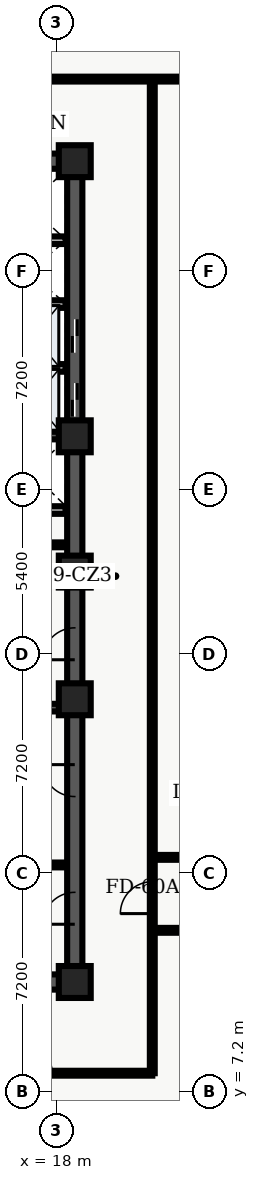
"""IFC4 building model, lengths in metres.
Left out: names, types, materials, properties, quantities, classifications, styles, units other than length and angle.
Written with IfcOpenShell. Run it as: python <this file> out.ifc"""

import sys

from ifc_helpers import new_model, entity, si_unit, converted_unit, direction, frame, origin_with_axes, origin_2d_with_axis, place, context, subcontext, project, spatial, polyline, rectangle, outline, extrude, element, fill, save


model = new_model("IFC4")
c1 = context("Model", 3, precision=1e-05, world=origin_with_axes(), true_north=direction((0.0, 1.0)))
c2 = subcontext(c1, "Body", "Model", "MODEL_VIEW")
j1 = project(units=[si_unit("LENGTHUNIT", "METRE"), converted_unit("PLANEANGLEUNIT", "DEGREE", entity("IfcPlaneAngleMeasure", 0.017), si_unit("PLANEANGLEUNIT", "RADIAN"), dimensions=[0, 0, 0, 0, 0, 0, 0])], contexts=[c1])
p1 = place(None, origin_with_axes())
s1 = spatial("IfcSite", under=j1, at=p1, CompositionType="ELEMENT")
p2 = place(p1, origin_with_axes())
s2 = spatial("IfcBuilding", under=s1, at=p2, CompositionType="ELEMENT")
p3 = place(p2, frame((0.0, 0.0, 160.2), z_axis=(0.0, 0.0, 1.0), x_axis=(1.0, 0.0, 0.0)))
s3 = spatial("IfcBuildingStorey", under=s2, at=p3, CompositionType="ELEMENT", Elevation=160.2)
p4 = place(p3, frame((11.4, 10.8, 0.0), z_axis=(0.0, 0.0, 1.0), x_axis=(1.0, 0.0, 0.0)))
e1 = element("IfcWall", 1, at=p4, inside=s3, PredefinedType="SHEAR", context=c2, shape_type="SweptSolid", body=[
    extrude(outline(polyline([(0.0, -0.25), (7.2, -0.25), (7.2, 0.25), (0.0, 0.25), (0.0, -0.25)])), origin_with_axes(), (0.0, 0.0, 1.0), 3.66),
])
p5 = place(p4, frame((2.625, 0.0, 0.0), z_axis=(0.0, 0.0, 1.0), x_axis=(1.0, 0.0, 0.0)))
e2 = element("IfcOpeningElement", 2, at=p5, cuts=e1, PredefinedType="OPENING", context=c2, shape_type="SweptSolid", body=[
    extrude(rectangle(XDim=1.05, YDim=0.52, at=origin_2d_with_axis()), origin_with_axes(), (0.0, 0.0, 1.0), 2.15),
])
p6 = place(p3, frame((11.4, 37.8, 0.0), z_axis=(0.0, 0.0, 1.0), x_axis=(1.0, 0.0, 0.0)))
e3 = element("IfcWall", 3, at=p6, inside=s3, PredefinedType="SHEAR", context=c2, shape_type="SweptSolid", body=[
    extrude(outline(polyline([(0.0, -0.25), (7.2, -0.25), (7.2, 0.25), (0.0, 0.25), (0.0, -0.25)])), origin_with_axes(), (0.0, 0.0, 1.0), 3.66),
])
p7 = place(p6, frame((2.625, 0.0, 0.0), z_axis=(0.0, 0.0, 1.0), x_axis=(1.0, 0.0, 0.0)))
e4 = element("IfcOpeningElement", 4, at=p7, cuts=e3, PredefinedType="OPENING", context=c2, shape_type="SweptSolid", body=[
    extrude(rectangle(XDim=1.05, YDim=0.52, at=origin_2d_with_axis()), origin_with_axes(), (0.0, 0.0, 1.0), 2.15),
])
p8 = place(p3, frame((18.6, 10.8, 0.0), z_axis=(0.0, 0.0, 1.0), x_axis=(0.0, 1.0, 0.0)))
e5 = element("IfcWall", 5, at=p8, inside=s3, PredefinedType="SHEAR", context=c2, shape_type="SweptSolid", body=[
    extrude(outline(polyline([(0.0, -0.25), (13.5, -0.25), (13.5, 0.25), (0.0, 0.25), (0.0, -0.25)])), origin_with_axes(), (0.0, 0.0, 1.0), 3.66),
])
p9 = place(p8, frame((11.125, 0.0, 0.0), z_axis=(0.0, 0.0, 1.0), x_axis=(1.0, 0.0, 0.0)))
e6 = element("IfcOpeningElement", 6, at=p9, cuts=e5, PredefinedType="OPENING", context=c2, shape_type="SweptSolid", body=[
    extrude(rectangle(XDim=1.05, YDim=0.52, at=origin_2d_with_axis()), origin_with_axes(), (0.0, 0.0, 1.0), 2.15),
])
p10 = place(p8, frame((2.425, 0.0, 0.0), z_axis=(0.0, 0.0, 1.0), x_axis=(1.0, 0.0, 0.0)))
e7 = element("IfcOpeningElement", 7, at=p10, cuts=e5, PredefinedType="OPENING", context=c2, shape_type="SweptSolid", body=[
    extrude(rectangle(XDim=1.05, YDim=0.52, at=origin_2d_with_axis()), origin_with_axes(), (0.0, 0.0, 1.0), 2.15),
])
p11 = place(p8, frame((6.625, 0.0, 0.0), z_axis=(0.0, 0.0, 1.0), x_axis=(1.0, 0.0, 0.0)))
e8 = element("IfcOpeningElement", 8, at=p11, cuts=e5, PredefinedType="OPENING", context=c2, shape_type="SweptSolid", body=[
    extrude(rectangle(XDim=1.05, YDim=0.52, at=origin_2d_with_axis()), origin_with_axes(), (0.0, 0.0, 1.0), 2.15),
])
p12 = place(p3, frame((18.6, 24.3, 0.0), z_axis=(0.0, 0.0, 1.0), x_axis=(0.0, 1.0, 0.0)))
e9 = element("IfcWall", 9, at=p12, inside=s3, PredefinedType="SHEAR", context=c2, shape_type="SweptSolid", body=[
    extrude(outline(polyline([(0.0, -0.25), (13.5, -0.25), (13.5, 0.25), (0.0, 0.25), (0.0, -0.25)])), origin_with_axes(), (0.0, 0.0, 1.0), 3.66),
])
p13 = place(p12, frame((5.65, 0.0, 0.0), z_axis=(0.0, 0.0, 1.0), x_axis=(1.0, 0.0, 0.0)))
e10 = element("IfcOpeningElement", 10, at=p13, cuts=e9, PredefinedType="OPENING", context=c2, shape_type="SweptSolid", body=[
    extrude(rectangle(XDim=1.1, YDim=0.52, at=origin_2d_with_axis()), origin_with_axes(), (0.0, 0.0, 1.0), 2.15),
])
p14 = place(p12, frame((7.75, 0.0, 0.0), z_axis=(0.0, 0.0, 1.0), x_axis=(1.0, 0.0, 0.0)))
e11 = element("IfcOpeningElement", 11, at=p14, cuts=e9, PredefinedType="OPENING", context=c2, shape_type="SweptSolid", body=[
    extrude(rectangle(XDim=1.1, YDim=0.52, at=origin_2d_with_axis()), origin_with_axes(), (0.0, 0.0, 1.0), 2.15),
])
for number, where, z_axis, x_axis in (
    (12, (11.65, 19.825, 0.0), (0.0, 0.0, 1.0), (1.0, 0.0, 0.0)),
    (13, (11.65, 28.775, 0.0), (0.0, 0.0, 1.0), (1.0, 0.0, 0.0)),
):
    element("IfcWall", number, at=place(p3, frame(where, z_axis=z_axis, x_axis=x_axis)), inside=s3, PredefinedType="SHEAR", context=c2, shape_type="SweptSolid", body=[
        extrude(outline(polyline([(0.0, -0.125), (6.7, -0.125), (6.7, 0.125), (0.0, 0.125), (0.0, -0.125)])), origin_with_axes(), (0.0, 0.0, 1.0), 3.66),
    ])
p15 = place(p3, frame((11.7, 24.1, 0.0), z_axis=(0.0, 0.0, 1.0), x_axis=(1.0, 0.0, 0.0)))
e14 = element("IfcWall", 14, at=p15, inside=s3, PredefinedType="SOLIDWALL", context=c2, shape_type="SweptSolid", body=[
    extrude(outline(polyline([(0.0, -0.125), (6.6, -0.125), (6.6, 0.125), (0.0, 0.125), (0.0, -0.125)])), origin_with_axes(), (0.0, 0.0, 1.0), 2.7),
])
p16 = place(p15, frame((3.75, 0.0, 0.0), z_axis=(0.0, 0.0, 1.0), x_axis=(1.0, 0.0, 0.0)))
e15 = element("IfcOpeningElement", 15, at=p16, cuts=e14, PredefinedType="OPENING", context=c2, shape_type="SweptSolid", body=[
    extrude(rectangle(XDim=0.9, YDim=0.27, at=origin_2d_with_axis()), origin_with_axes(), (0.0, 0.0, 1.0), 2.15),
])
p17 = place(p3, frame((11.7, 26.325, 0.0), z_axis=(0.0, 0.0, 1.0), x_axis=(1.0, 0.0, 0.0)))
e16 = element("IfcWall", 16, at=p17, inside=s3, PredefinedType="SOLIDWALL", context=c2, shape_type="SweptSolid", body=[
    extrude(outline(polyline([(0.0, -0.125), (6.6, -0.125), (6.6, 0.125), (0.0, 0.125), (0.0, -0.125)])), origin_with_axes(), (0.0, 0.0, 1.0), 2.7),
])
p18 = place(p17, frame((3.5, 0.0, 0.0), z_axis=(0.0, 0.0, 1.0), x_axis=(1.0, 0.0, 0.0)))
e17 = element("IfcOpeningElement", 17, at=p18, cuts=e16, PredefinedType="OPENING", context=c2, shape_type="SweptSolid", body=[
    extrude(rectangle(XDim=0.9, YDim=0.27, at=origin_2d_with_axis()), origin_with_axes(), (0.0, 0.0, 1.0), 2.15),
])
for number, where, z_axis, x_axis in (
    (18, (18.6, 10.8, 0.0), (0.0, 0.0, 1.0), (1.0, 0.0, 0.0)),
    (19, (18.6, 20.1, 0.0), (0.0, 0.0, 1.0), (1.0, 0.0, 0.0)),
    (20, (18.6, 24.3, 0.0), (0.0, 0.0, 1.0), (1.0, 0.0, 0.0)),
    (21, (18.6, 28.75, 0.0), (0.0, 0.0, 1.0), (1.0, 0.0, 0.0)),
    (22, (18.6, 37.8, 0.0), (0.0, 0.0, 1.0), (1.0, 0.0, 0.0)),
):
    element("IfcColumn", number, at=place(p3, frame(where, z_axis=z_axis, x_axis=x_axis)), inside=s3, PredefinedType="COLUMN", context=c2, shape_type="SweptSolid", body=[
        extrude(rectangle(XDim=1.05, YDim=1.05, at=origin_2d_with_axis()), origin_with_axes(), (0.0, 0.0, 1.0), 3.9),
    ])
p19 = place(p3, frame((14.62, 25.18, 0.0), z_axis=(0.0, 0.0, 1.0), x_axis=(1.0, 0.0, 0.0)))
e23 = element("IfcWall", 23, at=p19, inside=s3, PredefinedType="PARTITIONING", context=c2, shape_type="SweptSolid", body=[
    extrude(outline(polyline([(0.0, -0.08), (3.68, -0.08), (3.68, 0.08), (0.0, 0.08), (0.0, -0.08)])), origin_with_axes(), (0.0, 0.0, 1.0), 2.7),
])
p20 = place(p19, frame((1.95, 0.0, 0.0), z_axis=(0.0, 0.0, 1.0), x_axis=(1.0, 0.0, 0.0)))
e24 = element("IfcOpeningElement", 24, at=p20, cuts=e23, PredefinedType="OPENING", context=c2, shape_type="SweptSolid", body=[
    extrude(rectangle(XDim=0.9, YDim=0.18, at=origin_2d_with_axis()), origin_with_axes(), (0.0, 0.0, 1.0), 2.15),
])
p21 = place(p3, frame((15.84, 14.65, 0.0), z_axis=(0.0, 0.0, 1.0), x_axis=(1.0, 0.0, 0.0)))
e25 = element("IfcWall", 25, at=p21, inside=s3, PredefinedType="PARTITIONING", context=c2, shape_type="SweptSolid", body=[
    extrude(outline(polyline([(0.0, -0.08), (2.46, -0.08), (2.46, 0.08), (0.0, 0.08), (0.0, -0.08)])), origin_with_axes(), (0.0, 0.0, 1.0), 2.7),
])
for number, where, z_axis, x_axis in (
    (26, (15.84, 31.0, 0.0), (0.0, 0.0, 1.0), (1.0, 0.0, 0.0)),
    (27, (15.84, 33.1, 0.0), (0.0, 0.0, 1.0), (1.0, 0.0, 0.0)),
    (28, (15.84, 35.2, 0.0), (0.0, 0.0, 1.0), (1.0, 0.0, 0.0)),
):
    element("IfcWall", number, at=place(p3, frame(where, z_axis=z_axis, x_axis=x_axis)), inside=s3, PredefinedType="SOLIDWALL", context=c2, shape_type="SweptSolid", body=[
        extrude(outline(polyline([(0.0, -0.125), (2.46, -0.125), (2.46, 0.125), (0.0, 0.125), (0.0, -0.125)])), origin_with_axes(), (0.0, 0.0, 1.0), 2.7),
    ])
p22 = place(p3, frame((2.6, 7.8, 0.0), z_axis=(0.0, 0.0, 1.0), x_axis=(1.0, 0.0, 0.0)))
e29 = element("IfcWall", 29, at=p22, inside=s3, PredefinedType="PARTITIONING", context=c2, shape_type="SweptSolid", body=[
    extrude(outline(polyline([(0.0, -0.08), (18.55, -0.08), (18.55, 0.08), (0.0, 0.08), (0.0, -0.08)])), origin_with_axes(), (0.0, 0.0, 1.0), 2.7),
])
p23 = place(p22, frame((2.551, 0.0, 0.0), z_axis=(0.0, 0.0, 1.0), x_axis=(1.0, 0.0, 0.0)))
e30 = element("IfcOpeningElement", 30, at=p23, cuts=e29, PredefinedType="OPENING", context=c2, shape_type="SweptSolid", body=[
    extrude(rectangle(XDim=1.0, YDim=0.18, at=origin_2d_with_axis()), origin_with_axes(), (0.0, 0.0, 1.0), 2.15),
])
p24 = place(p22, frame((8.065, 0.0, 0.0), z_axis=(0.0, 0.0, 1.0), x_axis=(1.0, 0.0, 0.0)))
e31 = element("IfcOpeningElement", 31, at=p24, cuts=e29, PredefinedType="OPENING", context=c2, shape_type="SweptSolid", body=[
    extrude(rectangle(XDim=1.0, YDim=0.18, at=origin_2d_with_axis()), origin_with_axes(), (0.0, 0.0, 1.0), 2.15),
])
p25 = place(p22, frame((14.758, 0.0, 0.0), z_axis=(0.0, 0.0, 1.0), x_axis=(1.0, 0.0, 0.0)))
e32 = element("IfcOpeningElement", 32, at=p25, cuts=e29, PredefinedType="OPENING", context=c2, shape_type="SweptSolid", body=[
    extrude(rectangle(XDim=1.0, YDim=0.18, at=origin_2d_with_axis()), origin_with_axes(), (0.0, 0.0, 1.0), 2.15),
])
p26 = place(p3, frame((2.6, 40.5, 0.0), z_axis=(0.0, 0.0, 1.0), x_axis=(1.0, 0.0, 0.0)))
e33 = element("IfcWall", 33, at=p26, inside=s3, PredefinedType="PARTITIONING", context=c2, shape_type="SweptSolid", body=[
    extrude(outline(polyline([(0.0, -0.08), (20.481, -0.08), (20.481, 0.08), (0.0, 0.08), (0.0, -0.08)])), origin_with_axes(), (0.0, 0.0, 1.0), 2.7),
])
p27 = place(p26, frame((4.395, 0.0, 0.0), z_axis=(0.0, 0.0, 1.0), x_axis=(1.0, 0.0, 0.0)))
e34 = element("IfcOpeningElement", 34, at=p27, cuts=e33, PredefinedType="OPENING", context=c2, shape_type="SweptSolid", body=[
    extrude(rectangle(XDim=1.2, YDim=0.18, at=origin_2d_with_axis()), origin_with_axes(), (0.0, 0.0, 1.0), 2.2),
])
p28 = place(p26, frame((13.043, 0.0, 0.0), z_axis=(0.0, 0.0, 1.0), x_axis=(1.0, 0.0, 0.0)))
e35 = element("IfcOpeningElement", 35, at=p28, cuts=e33, PredefinedType="OPENING", context=c2, shape_type="SweptSolid", body=[
    extrude(rectangle(XDim=1.0, YDim=0.18, at=origin_2d_with_axis()), origin_with_axes(), (0.0, 0.0, 1.0), 2.15),
])
p29 = place(p3, frame((21.15, 7.8, 0.0), z_axis=(0.0, 0.0, 1.0), x_axis=(0.0, 1.0, 0.0)))
e36 = element("IfcWall", 36, at=p29, inside=s3, PredefinedType="PARTITIONING", context=c2, shape_type="SweptSolid", body=[
    extrude(outline(polyline([(0.0, -0.08), (32.7, -0.08), (32.7, 0.08), (0.0, 0.08), (0.0, -0.08)])), origin_with_axes(), (0.0, 0.0, 1.0), 2.7),
])
p30 = place(p29, frame((5.775, 0.0, 0.0), z_axis=(0.0, 0.0, 1.0), x_axis=(1.0, 0.0, 0.0)))
e37 = element("IfcOpeningElement", 37, at=p30, cuts=e36, PredefinedType="OPENING", context=c2, shape_type="SweptSolid", body=[
    extrude(rectangle(XDim=1.05, YDim=0.18, at=origin_2d_with_axis()), origin_with_axes(), (0.0, 0.0, 1.0), 2.15),
])
p31 = place(p3, frame((21.15, 12.5, 0.0), z_axis=(0.0, 0.0, 1.0), x_axis=(1.0, 0.0, 0.0)))
e38 = element("IfcWall", 38, at=p31, inside=s3, PredefinedType="PARTITIONING", context=c2, shape_type="SweptSolid", body=[
    extrude(outline(polyline([(0.0, -0.08), (15.2, -0.08), (15.2, 0.08), (0.0, 0.08), (0.0, -0.08)])), origin_with_axes(), (0.0, 0.0, 1.0), 2.7),
])
p32 = place(p31, frame((3.468, 0.0, 0.0), z_axis=(0.0, 0.0, 1.0), x_axis=(1.0, 0.0, 0.0)))
e39 = element("IfcOpeningElement", 39, at=p32, cuts=e38, PredefinedType="OPENING", context=c2, shape_type="SweptSolid", body=[
    extrude(rectangle(XDim=1.0, YDim=0.18, at=origin_2d_with_axis()), origin_with_axes(), (0.0, 0.0, 1.0), 2.15),
])
p33 = place(p31, frame((10.938, 0.0, 0.0), z_axis=(0.0, 0.0, 1.0), x_axis=(1.0, 0.0, 0.0)))
e40 = element("IfcOpeningElement", 40, at=p33, cuts=e38, PredefinedType="OPENING", context=c2, shape_type="SweptSolid", body=[
    extrude(rectangle(XDim=1.2, YDim=0.18, at=origin_2d_with_axis()), origin_with_axes(), (0.0, 0.0, 1.0), 2.2),
])
p34 = place(p3, frame((21.15, 14.9, 0.0), z_axis=(0.0, 0.0, 1.0), x_axis=(1.0, 0.0, 0.0)))
e41 = element("IfcWall", 41, at=p34, inside=s3, PredefinedType="PARTITIONING", context=c2, shape_type="SweptSolid", body=[
    extrude(outline(polyline([(0.0, -0.08), (15.2, -0.08), (15.2, 0.08), (0.0, 0.08), (0.0, -0.08)])), origin_with_axes(), (0.0, 0.0, 1.0), 2.7),
])
p35 = place(p34, frame((1.942, 0.0, 0.0), z_axis=(0.0, 0.0, 1.0), x_axis=(1.0, 0.0, 0.0)))
e42 = element("IfcOpeningElement", 42, at=p35, cuts=e41, PredefinedType="OPENING", context=c2, shape_type="SweptSolid", body=[
    extrude(rectangle(XDim=1.0, YDim=0.18, at=origin_2d_with_axis()), origin_with_axes(), (0.0, 0.0, 1.0), 2.15),
])
p36 = place(p34, frame((5.077, 0.0, 0.0), z_axis=(0.0, 0.0, 1.0), x_axis=(1.0, 0.0, 0.0)))
e43 = element("IfcOpeningElement", 43, at=p36, cuts=e41, PredefinedType="OPENING", context=c2, shape_type="SweptSolid", body=[
    extrude(rectangle(XDim=1.0, YDim=0.18, at=origin_2d_with_axis()), origin_with_axes(), (0.0, 0.0, 1.0), 2.15),
])
p37 = place(p34, frame((9.281, 0.0, 0.0), z_axis=(0.0, 0.0, 1.0), x_axis=(1.0, 0.0, 0.0)))
e44 = element("IfcOpeningElement", 44, at=p37, cuts=e41, PredefinedType="OPENING", context=c2, shape_type="SweptSolid", body=[
    extrude(rectangle(XDim=1.0, YDim=0.18, at=origin_2d_with_axis()), origin_with_axes(), (0.0, 0.0, 1.0), 2.15),
])
p38 = place(p34, frame((13.617, 0.0, 0.0), z_axis=(0.0, 0.0, 1.0), x_axis=(1.0, 0.0, 0.0)))
e45 = element("IfcOpeningElement", 45, at=p38, cuts=e41, PredefinedType="OPENING", context=c2, shape_type="SweptSolid", body=[
    extrude(rectangle(XDim=1.0, YDim=0.18, at=origin_2d_with_axis()), origin_with_axes(), (0.0, 0.0, 1.0), 2.15),
])
p39 = place(p12, frame((5.65, 0.0, 0.0), z_axis=(0.0, 0.0, 1.0), x_axis=(1.0, 0.0, 0.0)))
e46 = element("IfcDoor", 46, at=p39, inside=s3, OperationType="SLIDING_TO_LEFT", PredefinedType="DOOR", context=c2, shape_type="SweptSolid", body=[
    extrude(rectangle(XDim=1.1, YDim=0.09, at=origin_2d_with_axis()), origin_with_axes(), (0.0, 0.0, 1.0), 2.15),
])
fill(e10, e46)
p40 = place(p12, frame((7.75, 0.0, 0.0), z_axis=(0.0, 0.0, 1.0), x_axis=(1.0, 0.0, 0.0)))
e47 = element("IfcDoor", 47, at=p40, inside=s3, OperationType="SLIDING_TO_RIGHT", PredefinedType="DOOR", context=c2, shape_type="SweptSolid", body=[
    extrude(rectangle(XDim=1.1, YDim=0.09, at=origin_2d_with_axis()), origin_with_axes(), (0.0, 0.0, 1.0), 2.15),
])
fill(e11, e47)
p41 = place(p8, frame((11.125, 0.0, 0.0), z_axis=(0.0, 0.0, 1.0), x_axis=(1.0, 0.0, 0.0)))
e48 = element("IfcDoor", 48, at=p41, inside=s3, OperationType="SINGLE_SWING_LEFT", PredefinedType="DOOR", context=c2, shape_type="SweptSolid", body=[
    extrude(rectangle(XDim=1.05, YDim=0.09, at=origin_2d_with_axis()), origin_with_axes(), (0.0, 0.0, 1.0), 2.15),
])
fill(e6, e48)
p42 = place(p8, frame((2.425, 0.0, 0.0), z_axis=(0.0, 0.0, 1.0), x_axis=(1.0, 0.0, 0.0)))
e49 = element("IfcDoor", 49, at=p42, inside=s3, OperationType="SINGLE_SWING_LEFT", PredefinedType="DOOR", context=c2, shape_type="SweptSolid", body=[
    extrude(rectangle(XDim=1.05, YDim=0.09, at=origin_2d_with_axis()), origin_with_axes(), (0.0, 0.0, 1.0), 2.15),
])
fill(e7, e49)
p43 = place(p8, frame((6.625, 0.0, 0.0), z_axis=(0.0, 0.0, 1.0), x_axis=(1.0, 0.0, 0.0)))
e50 = element("IfcDoor", 50, at=p43, inside=s3, OperationType="SINGLE_SWING_RIGHT", PredefinedType="DOOR", context=c2, shape_type="SweptSolid", body=[
    extrude(rectangle(XDim=1.05, YDim=0.09, at=origin_2d_with_axis()), origin_with_axes(), (0.0, 0.0, 1.0), 2.15),
])
fill(e8, e50)
p44 = place(p22, frame((14.758, 0.0, 0.0), z_axis=(0.0, 0.0, 1.0), x_axis=(1.0, 0.0, 0.0)))
e51 = element("IfcDoor", 51, at=p44, inside=s3, OperationType="SINGLE_SWING_LEFT", PredefinedType="DOOR", context=c2, shape_type="SweptSolid", body=[
    extrude(rectangle(XDim=1.0, YDim=0.09, at=origin_2d_with_axis()), origin_with_axes(), (0.0, 0.0, 1.0), 2.15),
])
fill(e32, e51)
p45 = place(p29, frame((5.775, 0.0, 0.0), z_axis=(0.0, 0.0, 1.0), x_axis=(1.0, 0.0, 0.0)))
e52 = element("IfcDoor", 52, at=p45, inside=s3, OperationType="SINGLE_SWING_LEFT", PredefinedType="DOOR", context=c2, shape_type="SweptSolid", body=[
    extrude(rectangle(XDim=1.05, YDim=0.09, at=origin_2d_with_axis()), origin_with_axes(), (0.0, 0.0, 1.0), 2.15),
])
fill(e37, e52)
save(model, sys.argv[1])
